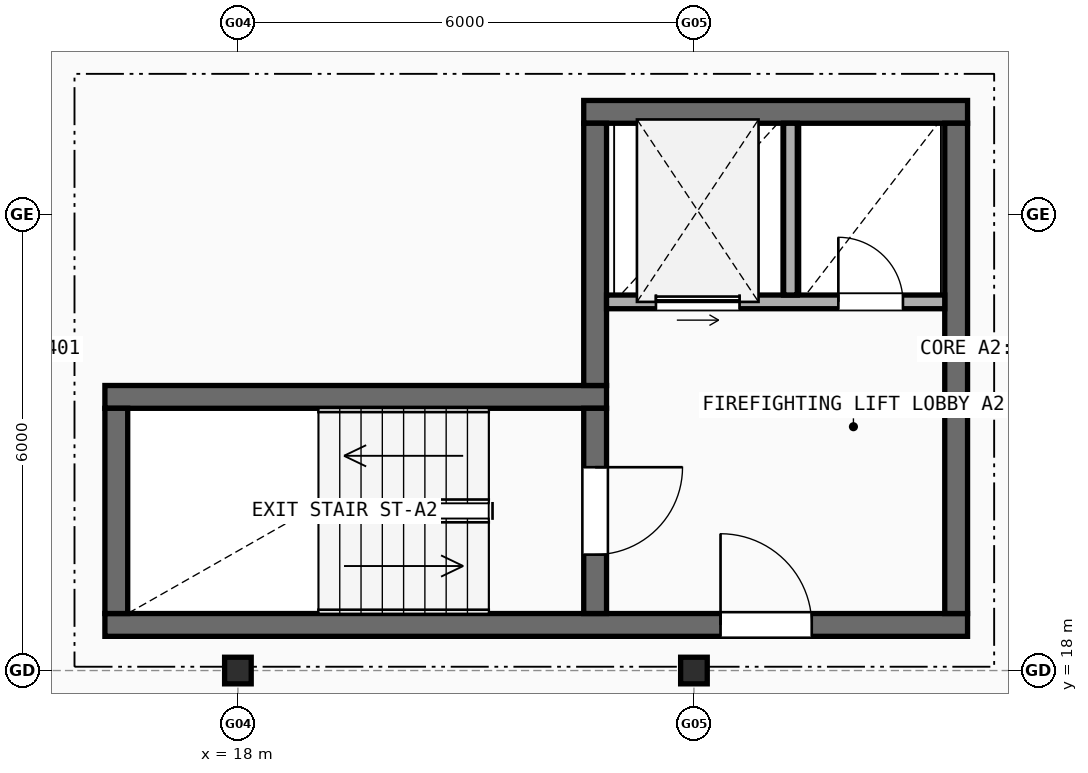
"""IFC4 building model, lengths in metres.
Left out: names, types, materials, properties, quantities, classifications, styles, units other than length and angle.
Written with IfcOpenShell. Run it as: python <this file> out.ifc"""

import sys

from ifc_helpers import new_model, si_unit, direction, frame, frame_2d, origin, origin_2d, place, context, subcontext, project, spatial, rectangle, extrude, element, fill, save


model = new_model("IFC4")
c1 = context("Model", 3, precision=1e-05, world=origin(), true_north=direction((0.0, 1.0)))
c2 = subcontext(c1, "Body", "Model", "MODEL_VIEW")
j1 = project(units=[si_unit("LENGTHUNIT", "METRE"), si_unit("PLANEANGLEUNIT", "RADIAN")], contexts=[c1])
p1 = place(None, origin())
s1 = spatial("IfcSite", under=j1, at=p1, CompositionType="ELEMENT")
p2 = place(p1, origin())
s2 = spatial("IfcBuilding", under=s1, at=p2, CompositionType="ELEMENT")
p3 = place(p2, frame((0.0, 0.0, 42.9)))
s3 = spatial("IfcBuildingStorey", under=s2, at=p3, CompositionType="ELEMENT", Elevation=42.9)
for number, where, z_axis, x_axis in (
    (1, (18.0, 18.0, 0.0), (0.0, 0.0, 1.0), (1.0, 0.0, 0.0)),
    (2, (24.0, 18.0, 0.0), (0.0, 0.0, 1.0), (1.0, 0.0, 0.0)),
):
    element("IfcColumn", number, at=place(p3, frame(where, z_axis=z_axis, x_axis=x_axis)), inside=s3, PredefinedType="COLUMN", context=c2, shape_type="SweptSolid", body=[
        extrude(rectangle(XDim=0.35, YDim=0.35, at=origin_2d()), origin(), (0.0, 0.0, 1.0), 3.005),
    ])
p4 = place(p3, frame((16.25, 18.6, 0.0), z_axis=(0.0, 0.0, 1.0), x_axis=(1.0, 0.0, 0.0)))
e3 = element("IfcWall", 3, at=p4, inside=s3, PredefinedType="SHEAR", context=c2, shape_type="SweptSolid", body=[
    extrude(rectangle(XDim=11.35, YDim=0.3, at=frame_2d((5.675, 0.0))), origin(), (0.0, 0.0, 1.0), 3.005),
])
p5 = place(p4, frame((8.1, 0.0, 0.0)))
e4 = element("IfcOpeningElement", 4, at=p5, cuts=e3, PredefinedType="OPENING", context=c2, shape_type="SweptSolid", body=[
    extrude(rectangle(XDim=1.2, YDim=2.15, at=frame_2d((0.6, 1.075))), frame((0.0, 0.16, 0.0), z_axis=(0.0, -1.0, 0.0), x_axis=(1.0, 0.0, 0.0)), (0.0, 0.0, 1.0), 0.32),
])
p6 = place(p3, frame((22.85, 21.6, 0.0), z_axis=(0.0, 0.0, 1.0), x_axis=(-1.0, 0.0, 0.0)))
e5 = element("IfcWall", 5, at=p6, inside=s3, PredefinedType="SHEAR", context=c2, shape_type="SweptSolid", body=[
    extrude(rectangle(XDim=6.6, YDim=0.3, at=frame_2d((3.3, 0.0))), origin(), (0.0, 0.0, 1.0), 3.005),
])
p7 = place(p3, frame((16.4, 21.45, 0.0), z_axis=(0.0, 0.0, 1.0), x_axis=(0.0, -1.0, 0.0)))
e6 = element("IfcWall", 6, at=p7, inside=s3, PredefinedType="SHEAR", context=c2, shape_type="SweptSolid", body=[
    extrude(rectangle(XDim=2.7, YDim=0.3, at=frame_2d((1.35, 0.0))), origin(), (0.0, 0.0, 1.0), 3.005),
])
p8 = place(p3, frame((22.7, 18.75, 0.0), z_axis=(0.0, 0.0, 1.0), x_axis=(0.0, 1.0, 0.0)))
e7 = element("IfcWall", 7, at=p8, inside=s3, PredefinedType="SHEAR", context=c2, shape_type="SweptSolid", body=[
    extrude(rectangle(XDim=2.7, YDim=0.3, at=frame_2d((1.35, 0.0))), origin(), (0.0, 0.0, 1.0), 3.005),
])
p9 = place(p8, frame((0.775, 0.0, 0.0)))
e8 = element("IfcOpeningElement", 8, at=p9, cuts=e7, PredefinedType="OPENING", context=c2, shape_type="SweptSolid", body=[
    extrude(rectangle(XDim=1.15, YDim=2.15, at=frame_2d((0.575, 1.075))), frame((0.0, 0.16, 0.0), z_axis=(0.0, -1.0, 0.0), x_axis=(1.0, 0.0, 0.0)), (0.0, 0.0, 1.0), 0.32),
])
p10 = place(p3, frame((27.6, 25.35, 0.0), z_axis=(0.0, 0.0, 1.0), x_axis=(-1.0, 0.0, 0.0)))
e9 = element("IfcWall", 9, at=p10, inside=s3, PredefinedType="SHEAR", context=c2, shape_type="SweptSolid", body=[
    extrude(rectangle(XDim=5.05, YDim=0.3, at=frame_2d((2.525, 0.0))), origin(), (0.0, 0.0, 1.0), 3.005),
])
p11 = place(p3, frame((27.45, 18.75, 0.0), z_axis=(0.0, 0.0, 1.0), x_axis=(0.0, 1.0, 0.0)))
e10 = element("IfcWall", 10, at=p11, inside=s3, PredefinedType="SHEAR", context=c2, shape_type="SweptSolid", body=[
    extrude(rectangle(XDim=6.45, YDim=0.3, at=frame_2d((3.225, 0.0))), origin(), (0.0, 0.0, 1.0), 3.005),
])
p12 = place(p3, frame((22.7, 21.75, 0.0), z_axis=(0.0, 0.0, 1.0), x_axis=(0.0, 1.0, 0.0)))
e11 = element("IfcWall", 11, at=p12, inside=s3, PredefinedType="SHEAR", context=c2, shape_type="SweptSolid", body=[
    extrude(rectangle(XDim=3.45, YDim=0.3, at=frame_2d((1.725, 0.0))), origin(), (0.0, 0.0, 1.0), 3.005),
])
p13 = place(p3, frame((22.85, 22.85, 0.0), z_axis=(0.0, 0.0, 1.0), x_axis=(1.0, 0.0, 0.0)))
e12 = element("IfcWall", 12, at=p13, inside=s3, PredefinedType="SOLIDWALL", context=c2, shape_type="SweptSolid", body=[
    extrude(rectangle(XDim=4.45, YDim=0.18, at=frame_2d((2.225, 0.0))), origin(), (0.0, 0.0, 1.0), 3.005),
])
p14 = place(p13, frame((0.65, 0.0, 0.0)))
e13 = element("IfcOpeningElement", 13, at=p14, cuts=e12, PredefinedType="OPENING", context=c2, shape_type="SweptSolid", body=[
    extrude(rectangle(XDim=1.1, YDim=2.15, at=frame_2d((0.55, 1.075))), frame((0.0, 0.1, 0.0), z_axis=(0.0, -1.0, 0.0), x_axis=(1.0, 0.0, 0.0)), (0.0, 0.0, 1.0), 0.2),
])
p15 = place(p13, frame((3.05, 0.0, 0.0)))
e14 = element("IfcOpeningElement", 14, at=p15, cuts=e12, PredefinedType="OPENING", context=c2, shape_type="SweptSolid", body=[
    extrude(rectangle(XDim=0.85, YDim=2.1, at=frame_2d((0.425, 1.05))), frame((0.0, 0.1, 0.0), z_axis=(0.0, -1.0, 0.0), x_axis=(1.0, 0.0, 0.0)), (0.0, 0.0, 1.0), 0.2),
])
p16 = place(p3, frame((25.27, 22.94, 0.0), z_axis=(0.0, 0.0, 1.0), x_axis=(0.0, 1.0, 0.0)))
e15 = element("IfcWall", 15, at=p16, inside=s3, PredefinedType="SOLIDWALL", context=c2, shape_type="SweptSolid", body=[
    extrude(rectangle(XDim=2.26, YDim=0.18, at=frame_2d((1.13, 0.0))), origin(), (0.0, 0.0, 1.0), 3.005),
])
p17 = place(p5, origin())
e16 = element("IfcDoor", 16, at=p17, inside=s3, OperationType="SINGLE_SWING_LEFT", PredefinedType="DOOR", context=c2, shape_type="SweptSolid", body=[
    extrude(rectangle(XDim=1.2, YDim=2.15, at=frame_2d((0.6, 1.075))), frame((0.0, 0.025, 0.0), z_axis=(0.0, -1.0, 0.0), x_axis=(1.0, 0.0, 0.0)), (0.0, 0.0, 1.0), 0.05),
])
fill(e4, e16)
p18 = place(p9, origin())
e17 = element("IfcDoor", 17, at=p18, inside=s3, OperationType="SINGLE_SWING_RIGHT", PredefinedType="DOOR", context=c2, shape_type="SweptSolid", body=[
    extrude(rectangle(XDim=1.15, YDim=2.15, at=frame_2d((0.575, 1.075))), frame((0.0, 0.025, 0.0), z_axis=(0.0, -1.0, 0.0), x_axis=(1.0, 0.0, 0.0)), (0.0, 0.0, 1.0), 0.05),
])
fill(e8, e17)
p19 = place(p14, origin())
e18 = element("IfcDoor", 18, at=p19, inside=s3, OperationType="SLIDING_TO_LEFT", PredefinedType="DOOR", context=c2, shape_type="SweptSolid", body=[
    extrude(rectangle(XDim=1.1, YDim=2.15, at=frame_2d((0.55, 1.075))), frame((0.0, 0.025, 0.0), z_axis=(0.0, -1.0, 0.0), x_axis=(1.0, 0.0, 0.0)), (0.0, 0.0, 1.0), 0.05),
])
fill(e13, e18)
p20 = place(p15, frame((0.85, 0.0, 0.0), z_axis=(0.0, 0.0, 1.0), x_axis=(-1.0, 0.0, 0.0)))
e19 = element("IfcDoor", 19, at=p20, inside=s3, OperationType="SINGLE_SWING_LEFT", PredefinedType="DOOR", context=c2, shape_type="SweptSolid", body=[
    extrude(rectangle(XDim=0.85, YDim=2.1, at=frame_2d((0.425, 1.05))), frame((0.0, 0.025, 0.0), z_axis=(0.0, -1.0, 0.0), x_axis=(1.0, 0.0, 0.0)), (0.0, 0.0, 1.0), 0.05),
])
fill(e14, e19)
save(model, sys.argv[1])
